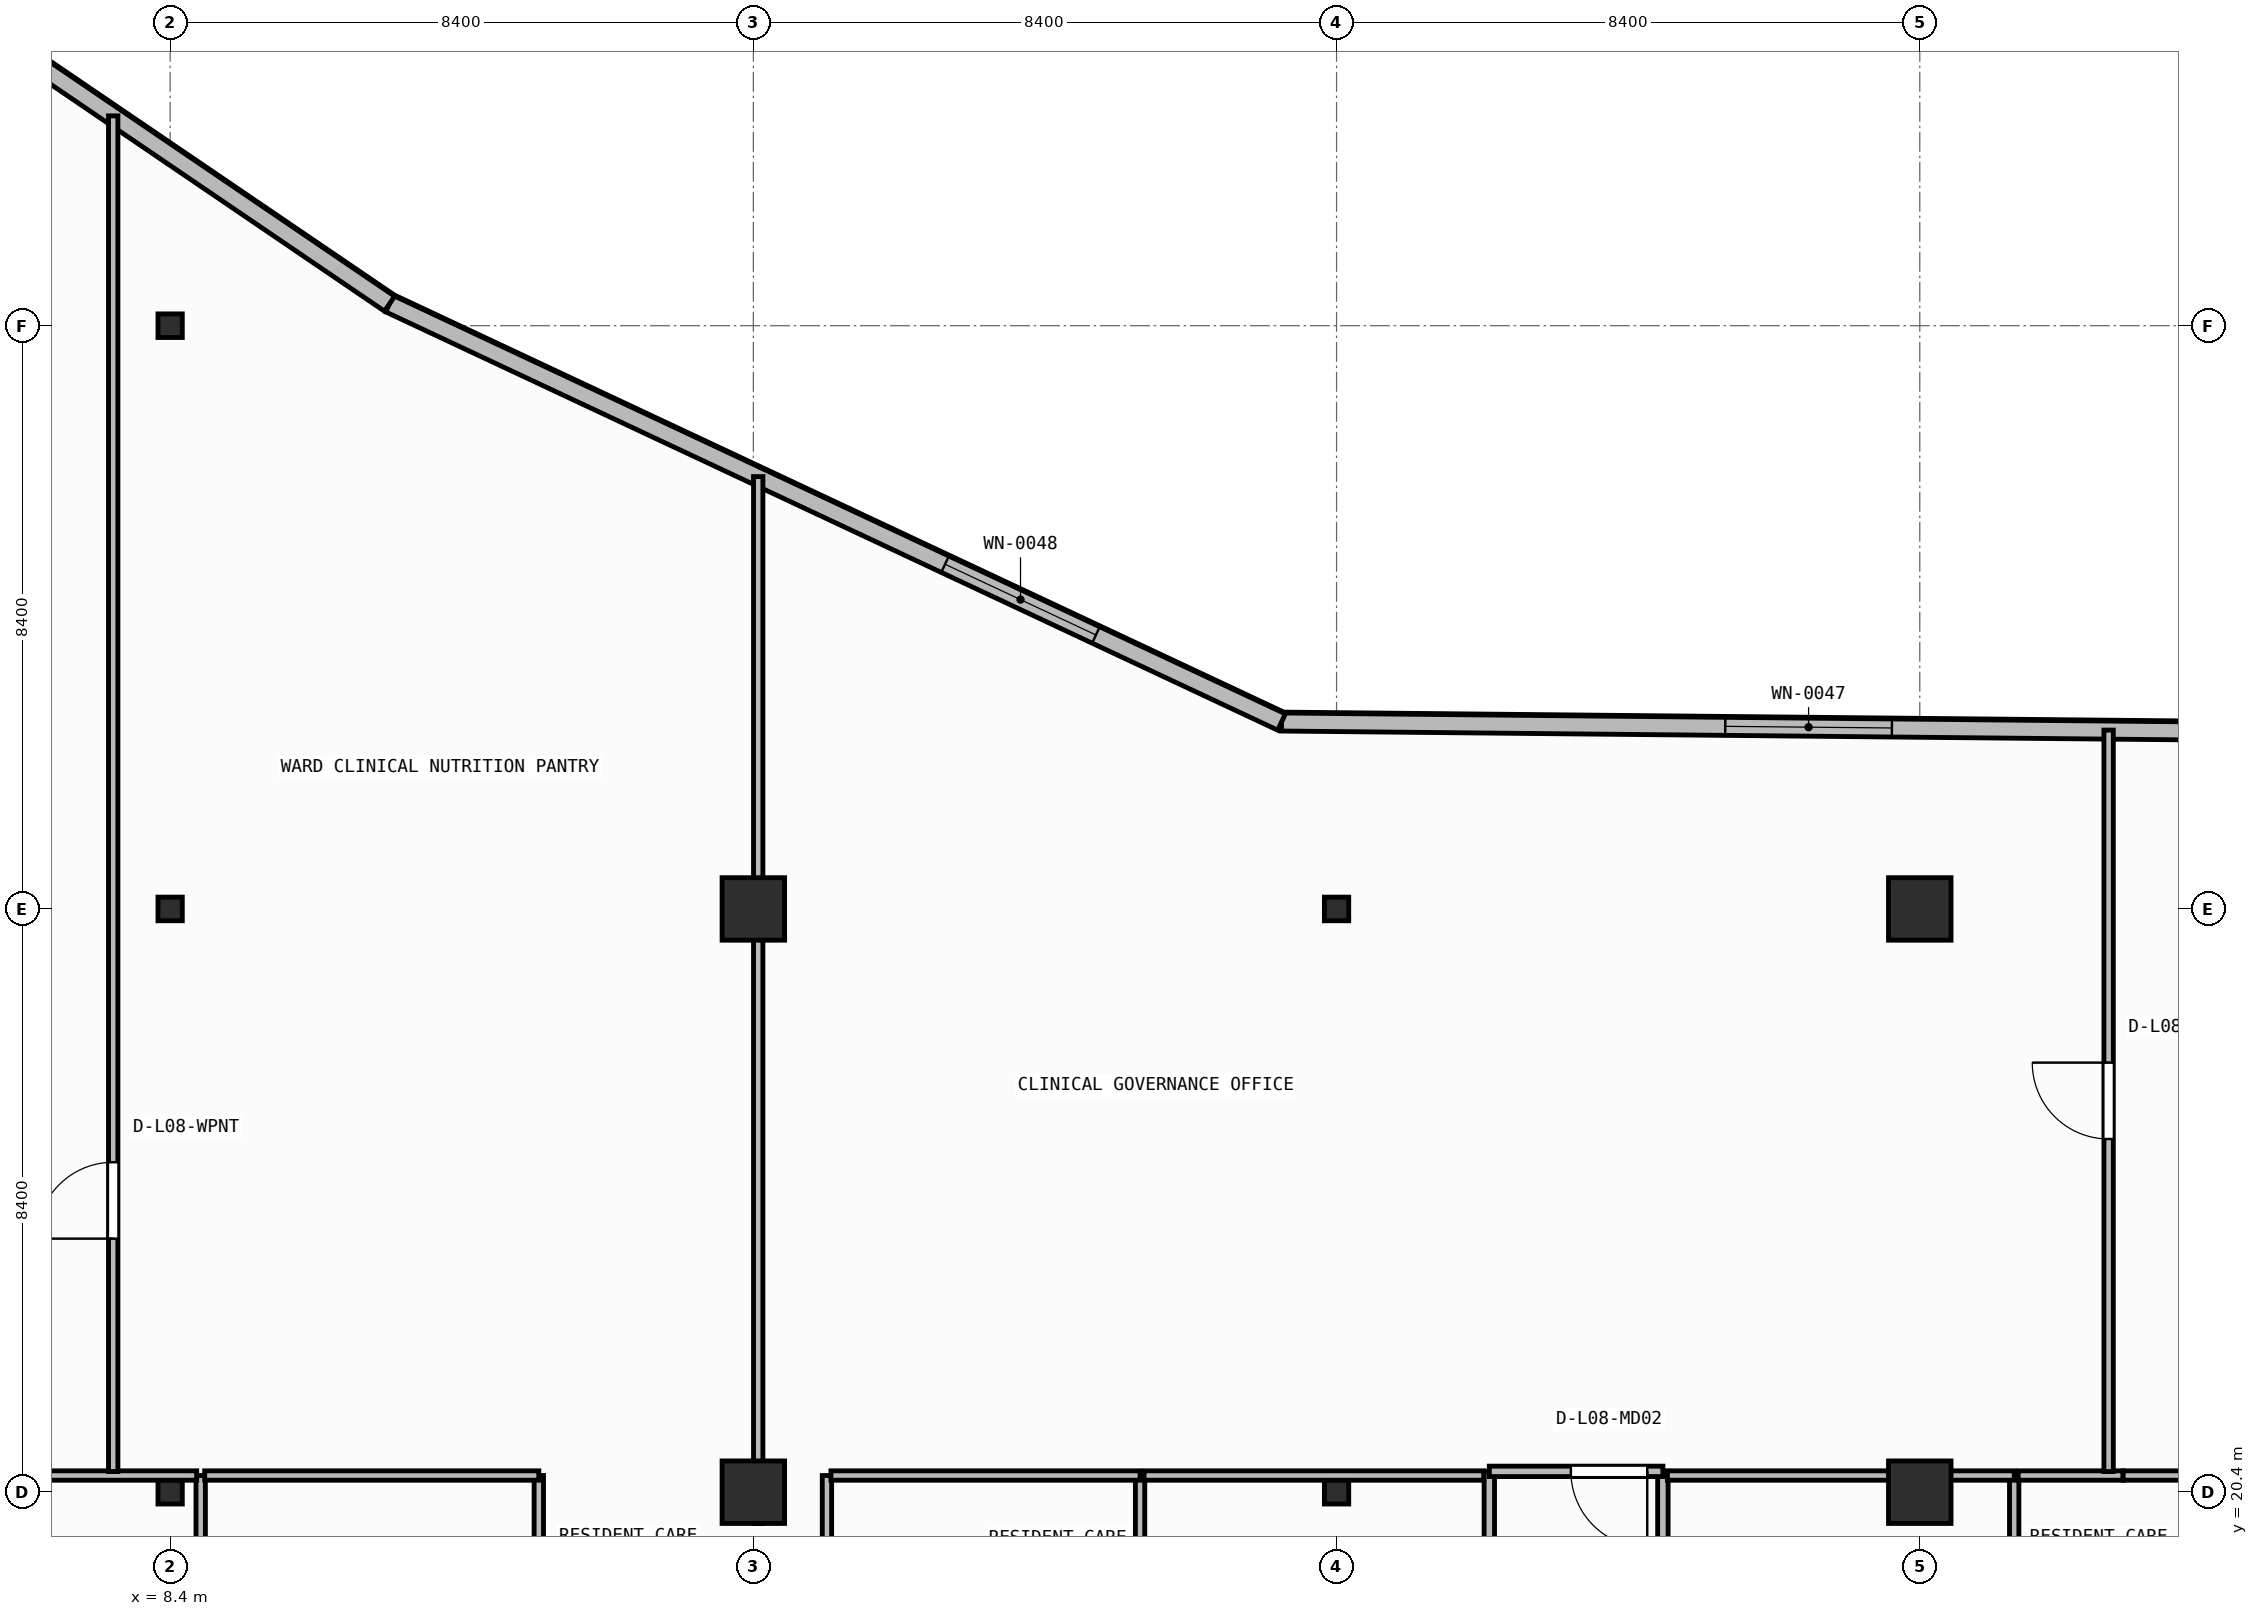
"""IFC4 building model, lengths in metres.
Left out: names, types, materials, properties, quantities, classifications, styles, units other than length and angle.
Written with IfcOpenShell. Run it as: python <this file> out.ifc"""

import sys

from ifc_helpers import new_model, si_unit, direction, frame, frame_2d, origin, origin_2d, place, context, subcontext, project, spatial, rectangle, i_section, extrude, element, fill, save


model = new_model("IFC4")
c1 = context("Model", 3, precision=1e-05, world=origin(), true_north=direction((0.0, 1.0)))
c2 = subcontext(c1, "Body", "Model", "MODEL_VIEW")
j1 = project(units=[si_unit("LENGTHUNIT", "METRE"), si_unit("PLANEANGLEUNIT", "RADIAN")], contexts=[c1])
p1 = place(None, origin())
s1 = spatial("IfcSite", under=j1, at=p1, CompositionType="ELEMENT")
p2 = place(p1, origin())
s2 = spatial("IfcBuilding", under=s1, at=p2, CompositionType="ELEMENT")
p3 = place(p2, frame((0.0, 0.0, 34.35)))
s3 = spatial("IfcBuildingStorey", under=s2, at=p3, CompositionType="ELEMENT", Elevation=34.35)
p4 = place(p3, frame((8.4, 20.4, 0.0), z_axis=(0.0, 0.0, 1.0), x_axis=(1.0, 0.0, 0.0)))
e1 = element("IfcColumn", 1, at=p4, inside=s3, PredefinedType="COLUMN", context=c2, shape_type="SweptSolid", body=[
    extrude(i_section(OverallWidth=0.35, OverallDepth=0.34, WebThickness=0.016, FlangeThickness=0.028, at=origin_2d()), origin(), (0.0, 0.0, 1.0), 3.95),
])
p5 = place(p3, frame((16.8, 20.4, 0.0), z_axis=(0.0, 0.0, 1.0), x_axis=(1.0, 0.0, 0.0)))
e2 = element("IfcColumn", 2, at=p5, inside=s3, PredefinedType="COLUMN", context=c2, shape_type="SweptSolid", body=[
    extrude(rectangle(XDim=0.9, YDim=0.9, at=origin_2d()), origin(), (0.0, 0.0, 1.0), 3.95),
])
p6 = place(p3, frame((25.2, 20.4, 0.0), z_axis=(0.0, 0.0, 1.0), x_axis=(1.0, 0.0, 0.0)))
e3 = element("IfcColumn", 3, at=p6, inside=s3, PredefinedType="COLUMN", context=c2, shape_type="SweptSolid", body=[
    extrude(i_section(OverallWidth=0.35, OverallDepth=0.34, WebThickness=0.016, FlangeThickness=0.028, at=origin_2d()), origin(), (0.0, 0.0, 1.0), 3.95),
])
p7 = place(p3, frame((33.6, 20.4, 0.0), z_axis=(0.0, 0.0, 1.0), x_axis=(1.0, 0.0, 0.0)))
e4 = element("IfcColumn", 4, at=p7, inside=s3, PredefinedType="COLUMN", context=c2, shape_type="SweptSolid", body=[
    extrude(rectangle(XDim=0.9, YDim=0.9, at=origin_2d()), origin(), (0.0, 0.0, 1.0), 3.95),
])
p8 = place(p3, frame((8.4, 28.8, 0.0), z_axis=(0.0, 0.0, 1.0), x_axis=(1.0, 0.0, 0.0)))
e5 = element("IfcColumn", 5, at=p8, inside=s3, PredefinedType="COLUMN", context=c2, shape_type="SweptSolid", body=[
    extrude(i_section(OverallWidth=0.35, OverallDepth=0.34, WebThickness=0.016, FlangeThickness=0.028, at=origin_2d()), origin(), (0.0, 0.0, 1.0), 3.95),
])
p9 = place(p3, frame((16.8, 28.8, 0.0), z_axis=(0.0, 0.0, 1.0), x_axis=(1.0, 0.0, 0.0)))
e6 = element("IfcColumn", 6, at=p9, inside=s3, PredefinedType="COLUMN", context=c2, shape_type="SweptSolid", body=[
    extrude(rectangle(XDim=0.9, YDim=0.9, at=origin_2d()), origin(), (0.0, 0.0, 1.0), 3.95),
])
p10 = place(p3, frame((25.2, 28.8, 0.0), z_axis=(0.0, 0.0, 1.0), x_axis=(1.0, 0.0, 0.0)))
e7 = element("IfcColumn", 7, at=p10, inside=s3, PredefinedType="COLUMN", context=c2, shape_type="SweptSolid", body=[
    extrude(i_section(OverallWidth=0.35, OverallDepth=0.34, WebThickness=0.016, FlangeThickness=0.028, at=origin_2d()), origin(), (0.0, 0.0, 1.0), 3.95),
])
p11 = place(p3, frame((33.6, 28.8, 0.0), z_axis=(0.0, 0.0, 1.0), x_axis=(1.0, 0.0, 0.0)))
e8 = element("IfcColumn", 8, at=p11, inside=s3, PredefinedType="COLUMN", context=c2, shape_type="SweptSolid", body=[
    extrude(rectangle(XDim=0.9, YDim=0.9, at=origin_2d()), origin(), (0.0, 0.0, 1.0), 3.95),
])
p12 = place(p3, frame((8.4, 37.2, 0.0), z_axis=(0.0, 0.0, 1.0), x_axis=(1.0, 0.0, 0.0)))
e9 = element("IfcColumn", 9, at=p12, inside=s3, PredefinedType="COLUMN", context=c2, shape_type="SweptSolid", body=[
    extrude(i_section(OverallWidth=0.35, OverallDepth=0.34, WebThickness=0.016, FlangeThickness=0.028, at=origin_2d()), origin(), (0.0, 0.0, 1.0), 3.95),
])
p13 = place(p3, frame((39.59, 31.344, 0.0), z_axis=(0.0, 0.0, 1.0), x_axis=(-0.999952362926, 0.009760731435, 0.0)))
e10 = element("IfcWall", 10, at=p13, inside=s3, PredefinedType="STANDARD", context=c2, shape_type="SweptSolid", body=[
    extrude(rectangle(XDim=15.183, YDim=0.26, at=frame_2d((7.591, 0.0))), origin(), (0.0, 0.0, 1.0), 3.71),
])
p14 = place(p13, frame((6.391, 0.0, 0.9)))
e11 = element("IfcOpeningElement", 11, at=p14, cuts=e10, PredefinedType="OPENING", context=c2, shape_type="SweptSolid", body=[
    extrude(rectangle(XDim=2.4, YDim=1.65, at=frame_2d((1.2, 0.825))), frame((0.0, 0.14, 0.0), z_axis=(0.0, -1.0, 0.0), x_axis=(1.0, 0.0, 0.0)), (0.0, 0.0, 1.0), 0.28),
])
p15 = place(p3, frame((24.408, 31.492, 0.0), z_axis=(0.0, 0.0, 1.0), x_axis=(-0.905396522918, 0.424566998585, 0.0)))
e12 = element("IfcWall", 12, at=p15, inside=s3, PredefinedType="STANDARD", context=c2, shape_type="SweptSolid", body=[
    extrude(rectangle(XDim=14.189, YDim=0.26, at=frame_2d((7.095, 0.0))), origin(), (0.0, 0.0, 1.0), 3.71),
])
p16 = place(p15, frame((2.953, 0.0, 0.9)))
e13 = element("IfcOpeningElement", 13, at=p16, cuts=e12, PredefinedType="OPENING", context=c2, shape_type="SweptSolid", body=[
    extrude(rectangle(XDim=2.4, YDim=1.65, at=frame_2d((1.2, 0.825))), frame((0.0, 0.14, 0.0), z_axis=(0.0, -1.0, 0.0), x_axis=(1.0, 0.0, 0.0)), (0.0, 0.0, 1.0), 0.28),
])
p17 = place(p3, frame((11.561, 37.517, 0.0), z_axis=(0.0, 0.0, 1.0), x_axis=(-0.827064743936, 0.562106670782, 0.0)))
e14 = element("IfcWall", 14, at=p17, inside=s3, PredefinedType="STANDARD", context=c2, shape_type="SweptSolid", body=[
    extrude(rectangle(XDim=10.641, YDim=0.26, at=frame_2d((5.32, 0.0))), origin(), (0.0, 0.0, 1.0), 3.71),
])
p18 = place(p17, frame((6.537, 0.0, 0.9)))
e15 = element("IfcOpeningElement", 15, at=p18, cuts=e14, PredefinedType="OPENING", context=c2, shape_type="SweptSolid", body=[
    extrude(rectangle(XDim=2.4, YDim=1.65, at=frame_2d((1.2, 0.825))), frame((0.0, 0.14, 0.0), z_axis=(0.0, -1.0, 0.0), x_axis=(1.0, 0.0, 0.0)), (0.0, 0.0, 1.0), 0.28),
])
p19 = place(p3, frame((27.4, 20.7, 0.0), z_axis=(0.0, 0.0, 1.0), x_axis=(0.0, -1.0, 0.0)))
e16 = element("IfcWall", 16, at=p19, inside=s3, PredefinedType="PARTITIONING", context=c2, shape_type="SweptSolid", body=[
    extrude(rectangle(XDim=6.0, YDim=0.15, at=frame_2d((3.0, 0.0))), origin(), (0.0, 0.0, 1.0), 3.71),
])
p20 = place(p3, frame((29.9, 17.814, 0.0), z_axis=(0.0, 0.0, 1.0), x_axis=(0.0, 1.0, 0.0)))
e17 = element("IfcWall", 17, at=p20, inside=s3, PredefinedType="PARTITIONING", context=c2, shape_type="SweptSolid", body=[
    extrude(rectangle(XDim=2.886, YDim=0.15, at=frame_2d((1.443, 0.0))), origin(), (0.0, 0.0, 1.0), 3.71),
])
p21 = place(p3, frame((29.9, 20.7, 0.0), z_axis=(0.0, 0.0, 1.0), x_axis=(-1.0, 0.0, 0.0)))
e18 = element("IfcWall", 18, at=p21, inside=s3, PredefinedType="PARTITIONING", context=c2, shape_type="SweptSolid", body=[
    extrude(rectangle(XDim=2.5, YDim=0.15, at=frame_2d((1.25, 0.0))), origin(), (0.0, 0.0, 1.0), 3.073),
])
p22 = place(p21, frame((0.225, 0.0, 0.0)))
e19 = element("IfcOpeningElement", 19, at=p22, cuts=e18, PredefinedType="OPENING", context=c2, shape_type="SweptSolid", body=[
    extrude(rectangle(XDim=1.1, YDim=2.1, at=frame_2d((0.55, 1.05))), frame((0.0, 0.085, 0.0), z_axis=(0.0, -1.0, 0.0), x_axis=(1.0, 0.0, 0.0)), (0.0, 0.0, 1.0), 0.17),
])
p23 = place(p3, frame((8.84, 17.833, 0.0), z_axis=(0.0, 0.0, 1.0), x_axis=(0.0, 1.0, 0.0)))
e20 = element("IfcWall", 20, at=p23, inside=s3, PredefinedType="PARTITIONING", context=c2, shape_type="SweptSolid", body=[
    extrude(rectangle(XDim=2.807, YDim=0.135, at=frame_2d((1.404, 0.0))), origin(), (0.0, 0.0, 1.0), 3.71),
])
p24 = place(p3, frame((8.782, 20.64, 0.0), z_axis=(0.0, 0.0, 1.0), x_axis=(-1.0, 0.0, 0.0)))
e21 = element("IfcWall", 21, at=p24, inside=s3, PredefinedType="PARTITIONING", context=c2, shape_type="SweptSolid", body=[
    extrude(rectangle(XDim=4.395, YDim=0.135, at=frame_2d((2.198, 0.0))), origin(), (0.0, 0.0, 1.0), 3.073),
])
p25 = place(p24, frame((3.023, 0.0, 0.0)))
e22 = element("IfcOpeningElement", 22, at=p25, cuts=e21, PredefinedType="OPENING", context=c2, shape_type="SweptSolid", body=[
    extrude(rectangle(XDim=1.1, YDim=2.1, at=frame_2d((0.55, 1.05))), frame((0.0, 0.077, 0.0), z_axis=(0.0, -1.0, 0.0), x_axis=(1.0, 0.0, 0.0)), (0.0, 0.0, 1.0), 0.155),
])
p26 = place(p3, frame((13.71, 17.833, 0.0), z_axis=(0.0, 0.0, 1.0), x_axis=(0.0, 1.0, 0.0)))
e23 = element("IfcWall", 23, at=p26, inside=s3, PredefinedType="PARTITIONING", context=c2, shape_type="SweptSolid", body=[
    extrude(rectangle(XDim=2.807, YDim=0.135, at=frame_2d((1.404, 0.0))), origin(), (0.0, 0.0, 1.0), 3.71),
])
p27 = place(p3, frame((13.71, 20.64, 0.0), z_axis=(0.0, 0.0, 1.0), x_axis=(-1.0, 0.0, 0.0)))
e24 = element("IfcWall", 24, at=p27, inside=s3, PredefinedType="PARTITIONING", context=c2, shape_type="SweptSolid", body=[
    extrude(rectangle(XDim=4.812, YDim=0.135, at=frame_2d((2.406, 0.0))), origin(), (0.0, 0.0, 1.0), 3.073),
])
for number, where, z_axis, x_axis in (
    (25, (17.86, 17.833, 0.0), (0.0, 0.0, 1.0), (0.0, 1.0, 0.0)),
    (26, (22.37, 17.833, 0.0), (0.0, 0.0, 1.0), (0.0, 1.0, 0.0)),
):
    element("IfcWall", number, at=place(p3, frame(where, z_axis=z_axis, x_axis=x_axis)), inside=s3, PredefinedType="PARTITIONING", context=c2, shape_type="SweptSolid", body=[
        extrude(rectangle(XDim=2.807, YDim=0.135, at=frame_2d((1.404, 0.0))), origin(), (0.0, 0.0, 1.0), 3.71),
    ])
p28 = place(p3, frame((22.37, 20.64, 0.0), z_axis=(0.0, 0.0, 1.0), x_axis=(-1.0, 0.0, 0.0)))
e27 = element("IfcWall", 27, at=p28, inside=s3, PredefinedType="PARTITIONING", context=c2, shape_type="SweptSolid", body=[
    extrude(rectangle(XDim=4.453, YDim=0.135, at=frame_2d((2.226, 0.0))), origin(), (0.0, 0.0, 1.0), 3.073),
])
p29 = place(p3, frame((27.32, 20.64, 0.0), z_axis=(0.0, 0.0, 1.0), x_axis=(-1.0, 0.0, 0.0)))
e28 = element("IfcWall", 28, at=p29, inside=s3, PredefinedType="PARTITIONING", context=c2, shape_type="SweptSolid", body=[
    extrude(rectangle(XDim=4.893, YDim=0.135, at=frame_2d((2.446, 0.0))), origin(), (0.0, 0.0, 1.0), 3.073),
])
p30 = place(p3, frame((34.96, 17.833, 0.0), z_axis=(0.0, 0.0, 1.0), x_axis=(0.0, 1.0, 0.0)))
e29 = element("IfcWall", 29, at=p30, inside=s3, PredefinedType="PARTITIONING", context=c2, shape_type="SweptSolid", body=[
    extrude(rectangle(XDim=2.807, YDim=0.135, at=frame_2d((1.404, 0.0))), origin(), (0.0, 0.0, 1.0), 3.71),
])
p31 = place(p3, frame((34.96, 20.64, 0.0), z_axis=(0.0, 0.0, 1.0), x_axis=(-1.0, 0.0, 0.0)))
e30 = element("IfcWall", 30, at=p31, inside=s3, PredefinedType="PARTITIONING", context=c2, shape_type="SweptSolid", body=[
    extrude(rectangle(XDim=4.995, YDim=0.135, at=frame_2d((2.498, 0.0))), origin(), (0.0, 0.0, 1.0), 3.073),
])
p32 = place(p3, frame((36.528, 20.64, 0.0), z_axis=(0.0, 0.0, 1.0), x_axis=(-1.0, 0.0, 0.0)))
e31 = element("IfcWall", 31, at=p32, inside=s3, PredefinedType="PARTITIONING", context=c2, shape_type="SweptSolid", body=[
    extrude(rectangle(XDim=1.51, YDim=0.135, at=frame_2d((0.755, 0.0))), origin(), (0.0, 0.0, 1.0), 3.073),
])
p33 = place(p3, frame((39.25, 20.64, 0.0), z_axis=(0.0, 0.0, 1.0), x_axis=(-1.0, 0.0, 0.0)))
e32 = element("IfcWall", 32, at=p33, inside=s3, PredefinedType="PARTITIONING", context=c2, shape_type="SweptSolid", body=[
    extrude(rectangle(XDim=2.72, YDim=0.135, at=frame_2d((1.36, 0.0))), origin(), (0.0, 0.0, 1.0), 3.073),
])
p34 = place(p3, frame((7.58, 20.698, 0.0), z_axis=(0.0, 0.0, 1.0), x_axis=(0.0, 1.0, 0.0)))
e33 = element("IfcWall", 33, at=p34, inside=s3, PredefinedType="PARTITIONING", context=c2, shape_type="SweptSolid", body=[
    extrude(rectangle(XDim=19.524, YDim=0.135, at=frame_2d((9.762, 0.0))), origin(), (0.0, 0.0, 1.0), 3.71),
])
p35 = place(p34, frame((3.354, 0.0, 0.0)))
e34 = element("IfcOpeningElement", 34, at=p35, cuts=e33, PredefinedType="OPENING", context=c2, shape_type="SweptSolid", body=[
    extrude(rectangle(XDim=1.1, YDim=2.1, at=frame_2d((0.55, 1.05))), frame((0.0, 0.077, 0.0), z_axis=(0.0, -1.0, 0.0), x_axis=(1.0, 0.0, 0.0)), (0.0, 0.0, 1.0), 0.155),
])
p36 = place(p3, frame((16.87, 19.95, 0.0), z_axis=(0.0, 0.0, 1.0), x_axis=(0.0, 1.0, 0.0)))
e35 = element("IfcWall", 35, at=p36, inside=s3, PredefinedType="PARTITIONING", context=c2, shape_type="SweptSolid", body=[
    extrude(rectangle(XDim=15.077, YDim=0.135, at=frame_2d((7.539, 0.0))), origin(), (0.0, 0.0, 1.0), 3.073),
])
p37 = place(p3, frame((36.32, 20.698, 0.0), z_axis=(0.0, 0.0, 1.0), x_axis=(0.0, 1.0, 0.0)))
e36 = element("IfcWall", 36, at=p37, inside=s3, PredefinedType="PARTITIONING", context=c2, shape_type="SweptSolid", body=[
    extrude(rectangle(XDim=10.678, YDim=0.135, at=frame_2d((5.339, 0.0))), origin(), (0.0, 0.0, 1.0), 3.71),
])
p38 = place(p37, frame((4.789, 0.0, 0.0)))
e37 = element("IfcOpeningElement", 37, at=p38, cuts=e36, PredefinedType="OPENING", context=c2, shape_type="SweptSolid", body=[
    extrude(rectangle(XDim=1.1, YDim=2.1, at=frame_2d((0.55, 1.05))), frame((0.0, 0.077, 0.0), z_axis=(0.0, -1.0, 0.0), x_axis=(1.0, 0.0, 0.0)), (0.0, 0.0, 1.0), 0.155),
])
p39 = place(p14, origin())
e38 = element("IfcWindow", 38, at=p39, inside=s3, PartitioningType="SINGLE_PANEL", PredefinedType="WINDOW", context=c2, shape_type="SweptSolid", body=[
    extrude(rectangle(XDim=2.4, YDim=1.65, at=frame_2d((1.2, 0.825))), frame((0.0, 0.03, 0.0), z_axis=(0.0, -1.0, 0.0), x_axis=(1.0, 0.0, 0.0)), (0.0, 0.0, 1.0), 0.06),
])
fill(e11, e38)
p40 = place(p16, origin())
e39 = element("IfcWindow", 39, at=p40, inside=s3, PartitioningType="SINGLE_PANEL", PredefinedType="WINDOW", context=c2, shape_type="SweptSolid", body=[
    extrude(rectangle(XDim=2.4, YDim=1.65, at=frame_2d((1.2, 0.825))), frame((0.0, 0.03, 0.0), z_axis=(0.0, -1.0, 0.0), x_axis=(1.0, 0.0, 0.0)), (0.0, 0.0, 1.0), 0.06),
])
fill(e13, e39)
p41 = place(p22, origin())
e40 = element("IfcDoor", 40, at=p41, inside=s3, OperationType="SINGLE_SWING_LEFT", PredefinedType="DOOR", context=c2, shape_type="SweptSolid", body=[
    extrude(rectangle(XDim=1.1, YDim=2.1, at=frame_2d((0.55, 1.05))), frame((0.0, 0.025, 0.0), z_axis=(0.0, -1.0, 0.0), x_axis=(1.0, 0.0, 0.0)), (0.0, 0.0, 1.0), 0.05),
])
fill(e19, e40)
p42 = place(p35, origin())
e41 = element("IfcDoor", 41, at=p42, inside=s3, OperationType="SINGLE_SWING_LEFT", PredefinedType="DOOR", context=c2, shape_type="SweptSolid", body=[
    extrude(rectangle(XDim=1.1, YDim=2.1, at=frame_2d((0.55, 1.05))), frame((0.0, 0.025, 0.0), z_axis=(0.0, -1.0, 0.0), x_axis=(1.0, 0.0, 0.0)), (0.0, 0.0, 1.0), 0.05),
])
fill(e34, e41)
p43 = place(p38, origin())
e42 = element("IfcDoor", 42, at=p43, inside=s3, OperationType="SINGLE_SWING_RIGHT", PredefinedType="DOOR", context=c2, shape_type="SweptSolid", body=[
    extrude(rectangle(XDim=1.1, YDim=2.1, at=frame_2d((0.55, 1.05))), frame((0.0, 0.025, 0.0), z_axis=(0.0, -1.0, 0.0), x_axis=(1.0, 0.0, 0.0)), (0.0, 0.0, 1.0), 0.05),
])
fill(e37, e42)
save(model, sys.argv[1])
